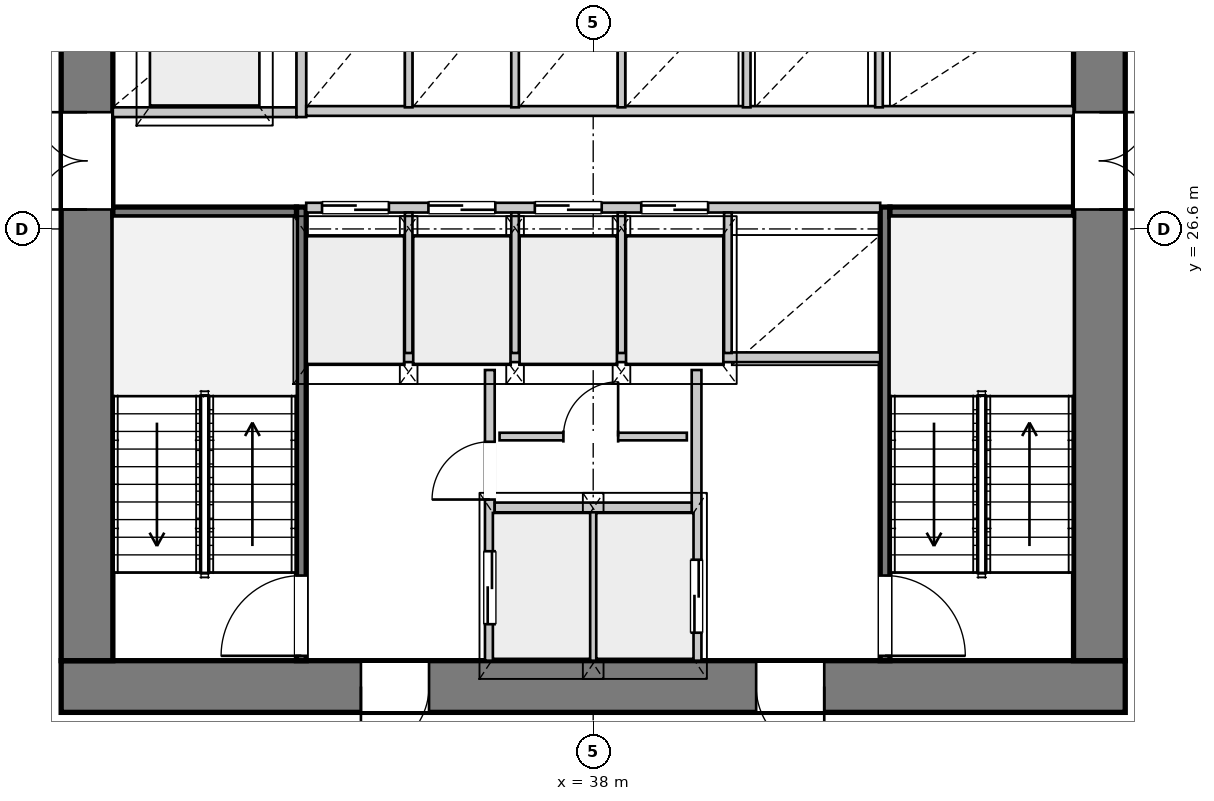
"""IFC4 building model, lengths in metres.
Left out: names, types, materials, properties, quantities, classifications, styles, units other than length and angle.
Written with IfcOpenShell. Run it as: python <this file> out.ifc"""

import sys

from ifc_helpers import new_model, si_unit, direction, frame, frame_2d, origin, place, context, subcontext, project, spatial, rectangle, extrude, source, transform, mapped, element, fill, save


model = new_model("IFC4")
c1 = context("Model", 3, precision=1e-05, world=origin(), true_north=direction((0.0, 1.0)))
c2 = subcontext(c1, "Body", "Model", "MODEL_VIEW")
j1 = project(units=[si_unit("LENGTHUNIT", "METRE"), si_unit("PLANEANGLEUNIT", "RADIAN")], contexts=[c1])
p1 = place(None, origin())
s1 = spatial("IfcSite", under=j1, at=p1, CompositionType="ELEMENT")
p2 = place(p1, origin())
s2 = spatial("IfcBuilding", under=s1, at=p2, CompositionType="ELEMENT")
p3 = place(p2, frame((0.0, 0.0, 29.3)))
s3 = spatial("IfcBuildingStorey", under=s2, at=p3, CompositionType="ELEMENT", Elevation=29.3)
p4 = place(p3, frame((46.75, 19.075, 0.0), z_axis=(0.0, 0.0, 1.0), x_axis=(-1.0, 0.0, 0.0)))
e1 = element("IfcWall", 1, at=p4, inside=s3, PredefinedType="SHEAR", context=c2, shape_type="SweptSolid", body=[
    extrude(rectangle(XDim=17.5, YDim=0.85, at=frame_2d((8.75, 0.0))), origin(), (0.0, 0.0, 1.0), 3.3),
])
p5 = place(p4, frame((4.95, 0.0, 0.0)))
e2 = element("IfcOpeningElement", 2, at=p5, cuts=e1, PredefinedType="OPENING", context=c2, shape_type="SweptSolid", body=[
    extrude(rectangle(XDim=1.12, YDim=2.25, at=frame_2d((0.56, 1.125))), frame((0.0, 0.435, 0.0), z_axis=(0.0, -1.0, 0.0), x_axis=(1.0, 0.0, 0.0)), (0.0, 0.0, 1.0), 0.87),
])
p6 = place(p4, frame((11.45, 0.0, 0.0)))
e3 = element("IfcOpeningElement", 3, at=p6, cuts=e1, PredefinedType="OPENING", context=c2, shape_type="SweptSolid", body=[
    extrude(rectangle(XDim=1.12, YDim=2.25, at=frame_2d((0.56, 1.125))), frame((0.0, 0.435, 0.0), z_axis=(0.0, -1.0, 0.0), x_axis=(1.0, 0.0, 0.0)), (0.0, 0.0, 1.0), 0.87),
])
p7 = place(p3, frame((29.675, 19.5, 0.0), z_axis=(0.0, 0.0, 1.0), x_axis=(0.0, 1.0, 0.0)))
e4 = element("IfcWall", 4, at=p7, inside=s3, PredefinedType="SHEAR", context=c2, shape_type="SweptSolid", body=[
    extrude(rectangle(XDim=14.2, YDim=0.85, at=frame_2d((7.1, 0.0))), origin(), (0.0, 0.0, 1.0), 3.3),
])
p8 = place(p7, frame((7.42, 0.0, 0.0)))
e5 = element("IfcOpeningElement", 5, at=p8, cuts=e4, PredefinedType="OPENING", context=c2, shape_type="SweptSolid", body=[
    extrude(rectangle(XDim=1.6, YDim=2.2, at=frame_2d((0.8, 1.1))), frame((0.0, 0.435, 0.0), z_axis=(0.0, -1.0, 0.0), x_axis=(1.0, 0.0, 0.0)), (0.0, 0.0, 1.0), 0.87),
])
p9 = place(p3, frame((46.325, 33.7, 0.0), z_axis=(0.0, 0.0, 1.0), x_axis=(0.0, -1.0, 0.0)))
e6 = element("IfcWall", 6, at=p9, inside=s3, PredefinedType="SHEAR", context=c2, shape_type="SweptSolid", body=[
    extrude(rectangle(XDim=14.2, YDim=0.85, at=frame_2d((7.1, 0.0))), origin(), (0.0, 0.0, 1.0), 3.3),
])
p10 = place(p9, frame((5.18, 0.0, 0.0)))
e7 = element("IfcOpeningElement", 7, at=p10, cuts=e6, PredefinedType="OPENING", context=c2, shape_type="SweptSolid", body=[
    extrude(rectangle(XDim=1.6, YDim=2.2, at=frame_2d((0.8, 1.1))), frame((0.0, 0.435, 0.0), z_axis=(0.0, -1.0, 0.0), x_axis=(1.0, 0.0, 0.0)), (0.0, 0.0, 1.0), 0.87),
])
p11 = place(p3, frame((33.2, 19.5, 0.0), z_axis=(0.0, 0.0, 1.0), x_axis=(0.0, 1.0, 0.0)))
e8 = element("IfcWall", 8, at=p11, inside=s3, PredefinedType="PARTITIONING", context=c2, shape_type="SweptSolid", body=[
    extrude(rectangle(XDim=7.46, YDim=0.16, at=frame_2d((3.73, 0.0))), origin(), (0.0, 0.0, 1.0), 3.3),
])
p12 = place(p11, frame((0.08, 0.0, 0.0)))
e9 = element("IfcOpeningElement", 9, at=p12, cuts=e8, PredefinedType="OPENING", context=c2, shape_type="SweptSolid", body=[
    extrude(rectangle(XDim=1.32, YDim=2.2, at=frame_2d((0.66, 1.1))), frame((0.0, 0.09, 0.0), z_axis=(0.0, -1.0, 0.0), x_axis=(1.0, 0.0, 0.0)), (0.0, 0.0, 1.0), 0.18),
])
p13 = place(p3, frame((30.1, 26.88, 0.0), z_axis=(0.0, 0.0, 1.0), x_axis=(1.0, 0.0, 0.0)))
e10 = element("IfcWall", 10, at=p13, inside=s3, PredefinedType="PARTITIONING", context=c2, shape_type="SweptSolid", body=[
    extrude(rectangle(XDim=3.02, YDim=0.16, at=frame_2d((1.51, 0.0))), origin(), (0.0, 0.0, 1.0), 3.3),
])
p14 = place(p3, frame((42.8, 26.96, 0.0), z_axis=(0.0, 0.0, 1.0), x_axis=(0.0, -1.0, 0.0)))
e11 = element("IfcWall", 11, at=p14, inside=s3, PredefinedType="PARTITIONING", context=c2, shape_type="SweptSolid", body=[
    extrude(rectangle(XDim=7.46, YDim=0.16, at=frame_2d((3.73, 0.0))), origin(), (0.0, 0.0, 1.0), 3.3),
])
p15 = place(p14, frame((6.06, 0.0, 0.0)))
e12 = element("IfcOpeningElement", 12, at=p15, cuts=e11, PredefinedType="OPENING", context=c2, shape_type="SweptSolid", body=[
    extrude(rectangle(XDim=1.32, YDim=2.2, at=frame_2d((0.66, 1.1))), frame((0.0, 0.09, 0.0), z_axis=(0.0, -1.0, 0.0), x_axis=(1.0, 0.0, 0.0)), (0.0, 0.0, 1.0), 0.18),
])
p16 = place(p3, frame((42.88, 26.88, 0.0), z_axis=(0.0, 0.0, 1.0), x_axis=(1.0, 0.0, 0.0)))
e13 = element("IfcWall", 13, at=p16, inside=s3, PredefinedType="PARTITIONING", context=c2, shape_type="SweptSolid", body=[
    extrude(rectangle(XDim=3.02, YDim=0.16, at=frame_2d((1.51, 0.0))), origin(), (0.0, 0.0, 1.0), 3.3),
])
p17 = place(p3, frame((36.3, 19.5, 0.0), z_axis=(0.0, 0.0, 1.0), x_axis=(0.0, 1.0, 0.0)))
e14 = element("IfcWall", 14, at=p17, inside=s3, PredefinedType="PARTITIONING", context=c2, shape_type="SweptSolid", body=[
    extrude(rectangle(XDim=4.78, YDim=0.16, at=frame_2d((2.39, 0.0))), origin(), (0.0, 0.0, 1.0), 3.3),
])
p18 = place(p17, frame((0.6, 0.0, 0.0)))
e15 = element("IfcOpeningElement", 15, at=p18, cuts=e14, PredefinedType="OPENING", context=c2, shape_type="SweptSolid", body=[
    extrude(rectangle(XDim=1.2, YDim=2.2, at=frame_2d((0.6, 1.1))), frame((0.0, 0.09, 0.0), z_axis=(0.0, -1.0, 0.0), x_axis=(1.0, 0.0, 0.0)), (0.0, 0.0, 1.0), 0.18),
])
p19 = place(p17, frame((2.65, 0.0, 0.0)))
e16 = element("IfcOpeningElement", 16, at=p19, cuts=e14, PredefinedType="OPENING", context=c2, shape_type="SweptSolid", body=[
    extrude(rectangle(XDim=0.95, YDim=2.1, at=frame_2d((0.475, 1.05))), frame((0.0, 0.09, 0.0), z_axis=(0.0, -1.0, 0.0), x_axis=(1.0, 0.0, 0.0)), (0.0, 0.0, 1.0), 0.18),
])
p20 = place(p3, frame((39.7, 24.28, 0.0), z_axis=(0.0, 0.0, 1.0), x_axis=(0.0, -1.0, 0.0)))
e17 = element("IfcWall", 17, at=p20, inside=s3, PredefinedType="PARTITIONING", context=c2, shape_type="SweptSolid", body=[
    extrude(rectangle(XDim=4.78, YDim=0.16, at=frame_2d((2.39, 0.0))), origin(), (0.0, 0.0, 1.0), 3.3),
])
p21 = place(p20, frame((3.12, 0.0, 0.0)))
e18 = element("IfcOpeningElement", 18, at=p21, cuts=e17, PredefinedType="OPENING", context=c2, shape_type="SweptSolid", body=[
    extrude(rectangle(XDim=1.2, YDim=2.2, at=frame_2d((0.6, 1.1))), frame((0.0, 0.09, 0.0), z_axis=(0.0, -1.0, 0.0), x_axis=(1.0, 0.0, 0.0)), (0.0, 0.0, 1.0), 0.18),
])
p22 = place(p3, frame((38.0, 19.5, 0.0), z_axis=(0.0, 0.0, 1.0), x_axis=(0.0, 1.0, 0.0)))
e19 = element("IfcWall", 19, at=p22, inside=s3, PredefinedType="PARTITIONING", context=c2, shape_type="SweptSolid", body=[
    extrude(rectangle(XDim=2.46, YDim=0.125, at=frame_2d((1.23, 0.0))), origin(), (0.0, 0.0, 1.0), 3.3),
])
p23 = place(p3, frame((36.38, 22.02, 0.0), z_axis=(0.0, 0.0, 1.0), x_axis=(1.0, 0.0, 0.0)))
e20 = element("IfcWall", 20, at=p23, inside=s3, PredefinedType="PARTITIONING", context=c2, shape_type="SweptSolid", body=[
    extrude(rectangle(XDim=3.24, YDim=0.16, at=frame_2d((1.62, 0.0))), origin(), (0.0, 0.0, 1.0), 3.3),
])
p24 = place(p3, frame((33.28, 24.49, 0.0), z_axis=(0.0, 0.0, 1.0), x_axis=(1.0, 0.0, 0.0)))
e21 = element("IfcWall", 21, at=p24, inside=s3, PredefinedType="PARTITIONING", context=c2, shape_type="SweptSolid", body=[
    extrude(rectangle(XDim=9.44, YDim=0.16, at=frame_2d((4.72, 0.0))), origin(), (0.0, 0.0, 1.0), 3.3),
])
p25 = place(p3, frame((36.46, 23.186, 0.0), z_axis=(0.0, 0.0, 1.0), x_axis=(1.0, 0.0, 0.0)))
e22 = element("IfcWall", 22, at=p25, inside=s3, PredefinedType="PARTITIONING", context=c2, shape_type="SweptSolid", body=[
    extrude(rectangle(XDim=3.08, YDim=0.125, at=frame_2d((1.54, 0.0))), origin(), (0.0, 0.0, 1.0), 3.3),
])
p26 = place(p25, frame((1.05, 0.0, 0.0)))
e23 = element("IfcOpeningElement", 23, at=p26, cuts=e22, PredefinedType="OPENING", context=c2, shape_type="SweptSolid", body=[
    extrude(rectangle(XDim=0.9, YDim=2.1, at=frame_2d((0.45, 1.05))), frame((0.0, 0.073, 0.0), z_axis=(0.0, -1.0, 0.0), x_axis=(1.0, 0.0, 0.0)), (0.0, 0.0, 1.0), 0.145),
])
p27 = place(p3, frame((30.1, 28.52, 0.0), z_axis=(0.0, 0.0, 1.0), x_axis=(1.0, 0.0, 0.0)))
e24 = element("IfcWall", 24, at=p27, inside=s3, PredefinedType="PARTITIONING", context=c2, shape_type="SweptSolid", body=[
    extrude(rectangle(XDim=3.02, YDim=0.16, at=frame_2d((1.51, 0.0))), origin(), (0.0, 0.0, 1.0), 3.3),
])
p28 = place(p3, frame((33.2, 28.44, 0.0), z_axis=(0.0, 0.0, 1.0), x_axis=(0.0, 1.0, 0.0)))
e25 = element("IfcWall", 25, at=p28, inside=s3, PredefinedType="PARTITIONING", context=c2, shape_type="SweptSolid", body=[
    extrude(rectangle(XDim=5.26, YDim=0.16, at=frame_2d((2.63, 0.0))), origin(), (0.0, 0.0, 1.0), 3.3),
])
p29 = place(p3, frame((33.28, 26.95, 0.0), z_axis=(0.0, 0.0, 1.0), x_axis=(1.0, 0.0, 0.0)))
e26 = element("IfcWall", 26, at=p29, inside=s3, PredefinedType="PARTITIONING", context=c2, shape_type="SweptSolid", body=[
    extrude(rectangle(XDim=9.44, YDim=0.16, at=frame_2d((4.72, 0.0))), origin(), (0.0, 0.0, 1.0), 3.3),
])
p30 = place(p29, frame((0.26, 0.0, 0.0)))
e27 = element("IfcOpeningElement", 27, at=p30, cuts=e26, PredefinedType="OPENING", context=c2, shape_type="SweptSolid", body=[
    extrude(rectangle(XDim=1.1, YDim=2.2, at=frame_2d((0.55, 1.1))), frame((0.0, 0.09, 0.0), z_axis=(0.0, -1.0, 0.0), x_axis=(1.0, 0.0, 0.0)), (0.0, 0.0, 1.0), 0.18),
])
p31 = place(p29, frame((2.01, 0.0, 0.0)))
e28 = element("IfcOpeningElement", 28, at=p31, cuts=e26, PredefinedType="OPENING", context=c2, shape_type="SweptSolid", body=[
    extrude(rectangle(XDim=1.1, YDim=2.2, at=frame_2d((0.55, 1.1))), frame((0.0, 0.09, 0.0), z_axis=(0.0, -1.0, 0.0), x_axis=(1.0, 0.0, 0.0)), (0.0, 0.0, 1.0), 0.18),
])
p32 = place(p29, frame((3.76, 0.0, 0.0)))
e29 = element("IfcOpeningElement", 29, at=p32, cuts=e26, PredefinedType="OPENING", context=c2, shape_type="SweptSolid", body=[
    extrude(rectangle(XDim=1.1, YDim=2.2, at=frame_2d((0.55, 1.1))), frame((0.0, 0.09, 0.0), z_axis=(0.0, -1.0, 0.0), x_axis=(1.0, 0.0, 0.0)), (0.0, 0.0, 1.0), 0.18),
])
p33 = place(p29, frame((5.51, 0.0, 0.0)))
e30 = element("IfcOpeningElement", 30, at=p33, cuts=e26, PredefinedType="OPENING", context=c2, shape_type="SweptSolid", body=[
    extrude(rectangle(XDim=1.1, YDim=2.2, at=frame_2d((0.55, 1.1))), frame((0.0, 0.09, 0.0), z_axis=(0.0, -1.0, 0.0), x_axis=(1.0, 0.0, 0.0)), (0.0, 0.0, 1.0), 0.18),
])
for number, where, z_axis, x_axis in (
    (31, (34.965, 24.56, 0.0), (0.0, 0.0, 1.0), (0.0, 1.0, 0.0)),
    (32, (36.715, 24.56, 0.0), (0.0, 0.0, 1.0), (0.0, 1.0, 0.0)),
    (33, (38.465, 24.56, 0.0), (0.0, 0.0, 1.0), (0.0, 1.0, 0.0)),
    (34, (40.215, 24.56, 0.0), (0.0, 0.0, 1.0), (0.0, 1.0, 0.0)),
):
    element("IfcWall", number, at=place(p3, frame(where, z_axis=z_axis, x_axis=x_axis)), inside=s3, PredefinedType="PARTITIONING", context=c2, shape_type="SweptSolid", body=[
        extrude(rectangle(XDim=2.31, YDim=0.125, at=frame_2d((1.155, 0.0))), origin(), (0.0, 0.0, 1.0), 3.3),
    ])
p34 = place(p3, frame((33.28, 28.54, 0.0), z_axis=(0.0, 0.0, 1.0), x_axis=(1.0, 0.0, 0.0)))
e35 = element("IfcWall", 35, at=p34, inside=s3, PredefinedType="PARTITIONING", context=c2, shape_type="SweptSolid", body=[
    extrude(rectangle(XDim=12.62, YDim=0.16, at=frame_2d((6.31, 0.0))), origin(), (0.0, 0.0, 1.0), 3.3),
])
for number, where, z_axis, x_axis in (
    (36, (34.965, 28.6, 0.0), (0.0, 0.0, 1.0), (0.0, 1.0, 0.0)),
    (37, (36.715, 28.6, 0.0), (0.0, 0.0, 1.0), (0.0, 1.0, 0.0)),
    (38, (38.465, 28.6, 0.0), (0.0, 0.0, 1.0), (0.0, 1.0, 0.0)),
    (39, (40.525, 28.6, 0.0), (0.0, 0.0, 1.0), (0.0, 1.0, 0.0)),
    (40, (42.7, 28.6, 0.0), (0.0, 0.0, 1.0), (0.0, 1.0, 0.0)),
):
    element("IfcWall", number, at=place(p3, frame(where, z_axis=z_axis, x_axis=x_axis)), inside=s3, PredefinedType="PARTITIONING", context=c2, shape_type="SweptSolid", body=[
        extrude(rectangle(XDim=1.92, YDim=0.125, at=frame_2d((0.96, 0.0))), origin(), (0.0, 0.0, 1.0), 3.3),
    ])
m1 = source(origin(), c2, "Body", "SweptSolid", [
    extrude(rectangle(XDim=1.12, YDim=2.25, at=frame_2d((0.56, 1.125))), frame((0.0, 0.025, 0.0), z_axis=(0.0, -1.0, 0.0), x_axis=(1.0, 0.0, 0.0)), (0.0, 0.0, 1.0), 0.05),
])
p35 = place(p5, origin())
e41 = element("IfcDoor", 41, at=p35, inside=s3, OperationType="SINGLE_SWING_LEFT", PredefinedType="DOOR", context=c2, shape_type="MappedRepresentation", body=[
    mapped(m1, transform((0.0, 0.0, 0.0), x_axis=(1.0, 0.0, 0.0), y_axis=(0.0, 1.0, 0.0), z_axis=(0.0, 0.0, 1.0), scale=1.0)),
])
fill(e2, e41)
p36 = place(p6, origin())
e42 = element("IfcDoor", 42, at=p36, inside=s3, OperationType="SINGLE_SWING_RIGHT", PredefinedType="DOOR", context=c2, shape_type="MappedRepresentation", body=[
    mapped(m1, transform((0.0, 0.0, 0.0), x_axis=(1.0, 0.0, 0.0), y_axis=(0.0, 1.0, 0.0), z_axis=(0.0, 0.0, 1.0), scale=1.0)),
])
fill(e3, e42)
m2 = source(origin(), c2, "Body", "SweptSolid", [
    extrude(rectangle(XDim=1.6, YDim=2.2, at=frame_2d((0.8, 1.1))), frame((0.0, 0.025, 0.0), z_axis=(0.0, -1.0, 0.0), x_axis=(1.0, 0.0, 0.0)), (0.0, 0.0, 1.0), 0.05),
])
p37 = place(p8, origin())
e43 = element("IfcDoor", 43, at=p37, inside=s3, OperationType="DOUBLE_DOOR_SINGLE_SWING", PredefinedType="DOOR", context=c2, shape_type="MappedRepresentation", body=[
    mapped(m2, transform((0.0, 0.0, 0.0), x_axis=(1.0, 0.0, 0.0), y_axis=(0.0, 1.0, 0.0), z_axis=(0.0, 0.0, 1.0), scale=1.0)),
])
fill(e5, e43)
p38 = place(p10, origin())
e44 = element("IfcDoor", 44, at=p38, inside=s3, OperationType="DOUBLE_DOOR_SINGLE_SWING", PredefinedType="DOOR", context=c2, shape_type="MappedRepresentation", body=[
    mapped(m2, transform((0.0, 0.0, 0.0), x_axis=(1.0, 0.0, 0.0), y_axis=(0.0, 1.0, 0.0), z_axis=(0.0, 0.0, 1.0), scale=1.0)),
])
fill(e7, e44)
m3 = source(origin(), c2, "Body", "SweptSolid", [
    extrude(rectangle(XDim=1.32, YDim=2.2, at=frame_2d((0.66, 1.1))), frame((0.0, 0.025, 0.0), z_axis=(0.0, -1.0, 0.0), x_axis=(1.0, 0.0, 0.0)), (0.0, 0.0, 1.0), 0.05),
])
p39 = place(p12, origin())
e45 = element("IfcDoor", 45, at=p39, inside=s3, OperationType="SINGLE_SWING_LEFT", PredefinedType="DOOR", context=c2, shape_type="MappedRepresentation", body=[
    mapped(m3, transform((0.0, 0.0, 0.0), x_axis=(1.0, 0.0, 0.0), y_axis=(0.0, 1.0, 0.0), z_axis=(0.0, 0.0, 1.0), scale=1.0)),
])
fill(e9, e45)
p40 = place(p15, origin())
e46 = element("IfcDoor", 46, at=p40, inside=s3, OperationType="SINGLE_SWING_RIGHT", PredefinedType="DOOR", context=c2, shape_type="MappedRepresentation", body=[
    mapped(m3, transform((0.0, 0.0, 0.0), x_axis=(1.0, 0.0, 0.0), y_axis=(0.0, 1.0, 0.0), z_axis=(0.0, 0.0, 1.0), scale=1.0)),
])
fill(e12, e46)
m4 = source(origin(), c2, "Body", "SweptSolid", [
    extrude(rectangle(XDim=1.2, YDim=2.2, at=frame_2d((0.6, 1.1))), frame((0.0, 0.025, 0.0), z_axis=(0.0, -1.0, 0.0), x_axis=(1.0, 0.0, 0.0)), (0.0, 0.0, 1.0), 0.05),
])
p41 = place(p18, origin())
e47 = element("IfcDoor", 47, at=p41, inside=s3, OperationType="DOUBLE_DOOR_SLIDING", PredefinedType="DOOR", context=c2, shape_type="MappedRepresentation", body=[
    mapped(m4, transform((0.0, 0.0, 0.0), x_axis=(1.0, 0.0, 0.0), y_axis=(0.0, 1.0, 0.0), z_axis=(0.0, 0.0, 1.0), scale=1.0)),
])
fill(e15, e47)
m5 = source(origin(), c2, "Body", "SweptSolid", [
    extrude(rectangle(XDim=0.95, YDim=2.1, at=frame_2d((0.475, 1.05))), frame((0.0, 0.025, 0.0), z_axis=(0.0, -1.0, 0.0), x_axis=(1.0, 0.0, 0.0)), (0.0, 0.0, 1.0), 0.05),
])
p42 = place(p19, origin())
e48 = element("IfcDoor", 48, at=p42, inside=s3, OperationType="SINGLE_SWING_LEFT", PredefinedType="DOOR", context=c2, shape_type="MappedRepresentation", body=[
    mapped(m5, transform((0.0, 0.0, 0.0), x_axis=(1.0, 0.0, 0.0), y_axis=(0.0, 1.0, 0.0), z_axis=(0.0, 0.0, 1.0), scale=1.0)),
])
fill(e16, e48)
m6 = source(origin(), c2, "Body", "SweptSolid", [
    extrude(rectangle(XDim=0.9, YDim=2.1, at=frame_2d((0.45, 1.05))), frame((0.0, 0.025, 0.0), z_axis=(0.0, -1.0, 0.0), x_axis=(1.0, 0.0, 0.0)), (0.0, 0.0, 1.0), 0.05),
])
p43 = place(p26, origin())
e49 = element("IfcDoor", 49, at=p43, inside=s3, OperationType="SINGLE_SWING_RIGHT", PredefinedType="DOOR", context=c2, shape_type="MappedRepresentation", body=[
    mapped(m6, transform((0.0, 0.0, 0.0), x_axis=(1.0, 0.0, 0.0), y_axis=(0.0, 1.0, 0.0), z_axis=(0.0, 0.0, 1.0), scale=1.0)),
])
fill(e23, e49)
p44 = place(p21, origin())
e50 = element("IfcDoor", 50, at=p44, inside=s3, OperationType="DOUBLE_DOOR_SLIDING", PredefinedType="DOOR", context=c2, shape_type="MappedRepresentation", body=[
    mapped(m4, transform((0.0, 0.0, 0.0), x_axis=(1.0, 0.0, 0.0), y_axis=(0.0, 1.0, 0.0), z_axis=(0.0, 0.0, 1.0), scale=1.0)),
])
fill(e18, e50)
m7 = source(origin(), c2, "Body", "SweptSolid", [
    extrude(rectangle(XDim=1.1, YDim=2.2, at=frame_2d((0.55, 1.1))), frame((0.0, 0.025, 0.0), z_axis=(0.0, -1.0, 0.0), x_axis=(1.0, 0.0, 0.0)), (0.0, 0.0, 1.0), 0.05),
])
p45 = place(p30, origin())
e51 = element("IfcDoor", 51, at=p45, inside=s3, OperationType="DOUBLE_DOOR_SLIDING", PredefinedType="DOOR", context=c2, shape_type="MappedRepresentation", body=[
    mapped(m7, transform((0.0, 0.0, 0.0), x_axis=(1.0, 0.0, 0.0), y_axis=(0.0, 1.0, 0.0), z_axis=(0.0, 0.0, 1.0), scale=1.0)),
])
fill(e27, e51)
p46 = place(p31, origin())
e52 = element("IfcDoor", 52, at=p46, inside=s3, OperationType="DOUBLE_DOOR_SLIDING", PredefinedType="DOOR", context=c2, shape_type="MappedRepresentation", body=[
    mapped(m7, transform((0.0, 0.0, 0.0), x_axis=(1.0, 0.0, 0.0), y_axis=(0.0, 1.0, 0.0), z_axis=(0.0, 0.0, 1.0), scale=1.0)),
])
fill(e28, e52)
p47 = place(p32, origin())
e53 = element("IfcDoor", 53, at=p47, inside=s3, OperationType="DOUBLE_DOOR_SLIDING", PredefinedType="DOOR", context=c2, shape_type="MappedRepresentation", body=[
    mapped(m7, transform((0.0, 0.0, 0.0), x_axis=(1.0, 0.0, 0.0), y_axis=(0.0, 1.0, 0.0), z_axis=(0.0, 0.0, 1.0), scale=1.0)),
])
fill(e29, e53)
p48 = place(p33, origin())
e54 = element("IfcDoor", 54, at=p48, inside=s3, OperationType="DOUBLE_DOOR_SLIDING", PredefinedType="DOOR", context=c2, shape_type="MappedRepresentation", body=[
    mapped(m7, transform((0.0, 0.0, 0.0), x_axis=(1.0, 0.0, 0.0), y_axis=(0.0, 1.0, 0.0), z_axis=(0.0, 0.0, 1.0), scale=1.0)),
])
fill(e30, e54)
save(model, sys.argv[1])
